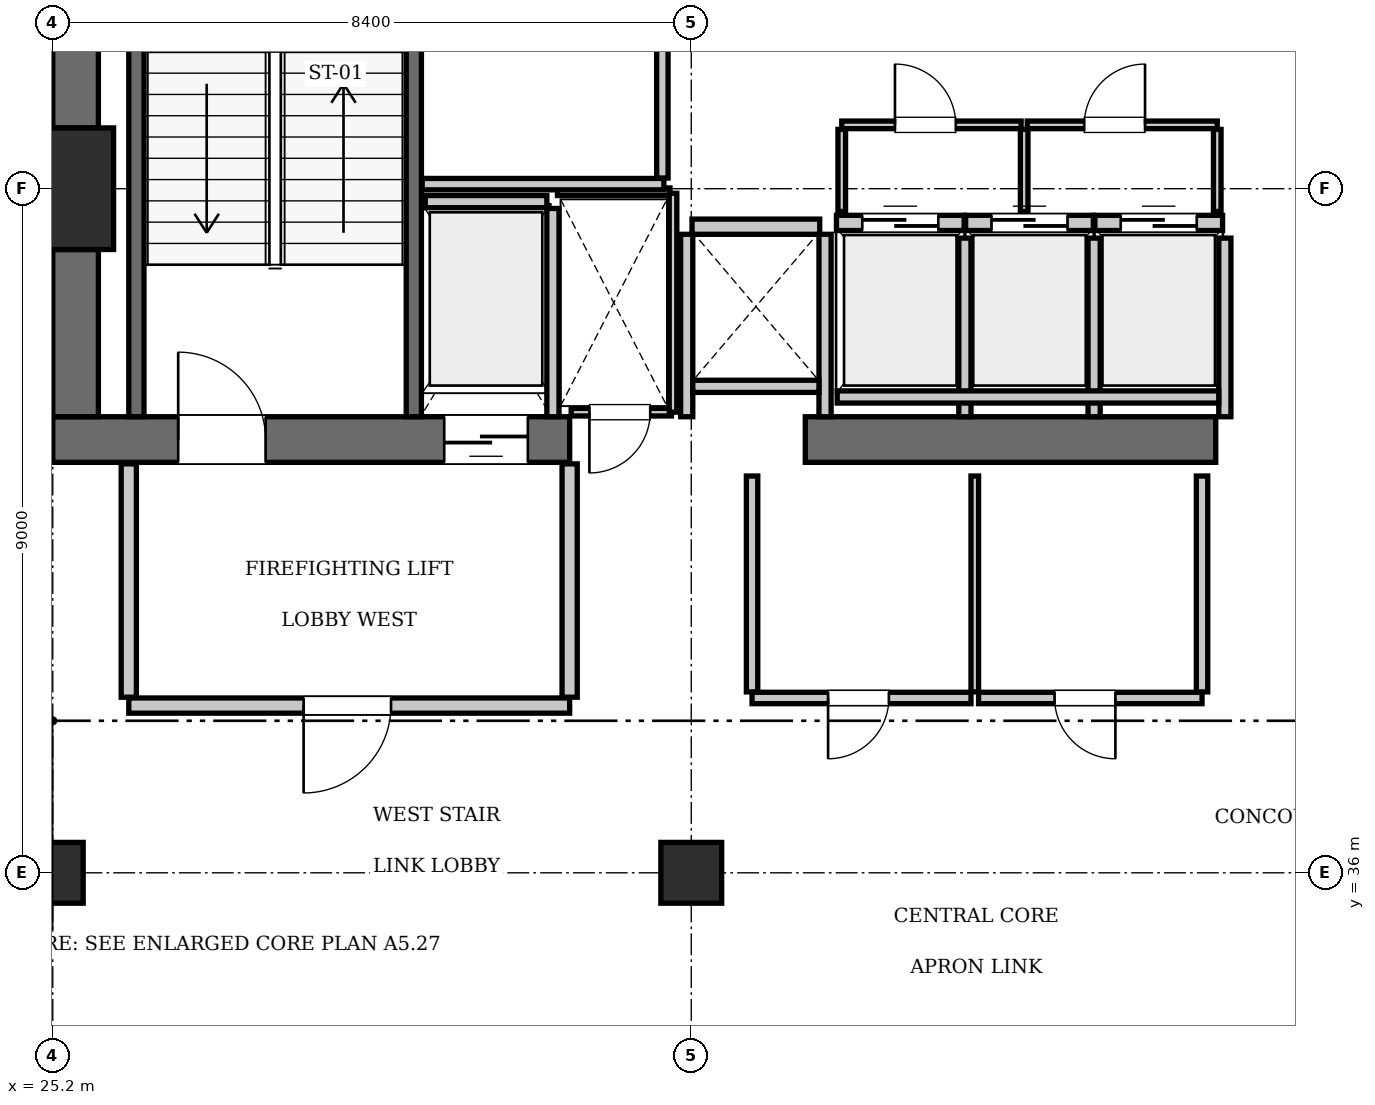
"""IFC4 building model, lengths in metres.
Left out: names, types, materials, properties, quantities, classifications, styles, units other than length and angle.
Written with IfcOpenShell. Run it as: python <this file> out.ifc"""

import sys

from ifc_helpers import new_model, si_unit, direction, frame, frame_2d, origin, origin_2d, place, context, subcontext, project, spatial, rectangle, extrude, element, fill, save


model = new_model("IFC4")
c1 = context("Model", 3, precision=1e-05, world=origin(), true_north=direction((0.0, 1.0)))
c2 = subcontext(c1, "Body", "Model", "MODEL_VIEW")
j1 = project(units=[si_unit("LENGTHUNIT", "METRE"), si_unit("PLANEANGLEUNIT", "RADIAN")], contexts=[c1])
p1 = place(None, origin())
s1 = spatial("IfcSite", under=j1, at=p1, CompositionType="ELEMENT")
p2 = place(p1, origin())
s2 = spatial("IfcBuilding", under=s1, at=p2, CompositionType="ELEMENT")
p3 = place(p2, frame((0.0, 0.0, 289.45)))
s3 = spatial("IfcBuildingStorey", under=s2, at=p3, CompositionType="ELEMENT", Elevation=289.45)
p4 = place(p3, frame((25.2, 45.0, 0.0), z_axis=(0.0, 0.0, 1.0), x_axis=(1.0, 0.0, 0.0)))
e1 = element("IfcColumn", 1, at=p4, inside=s3, PredefinedType="COLUMN", context=c2, shape_type="SweptSolid", body=[
    extrude(rectangle(XDim=1.6, YDim=1.6, at=origin_2d()), origin(), (0.0, 0.0, 1.0), 3.85),
])
p5 = place(p3, frame((25.2, 41.7, 0.0), z_axis=(0.0, 0.0, 1.0), x_axis=(1.0, 0.0, 0.0)))
e2 = element("IfcWall", 2, at=p5, inside=s3, PredefinedType="SHEAR", context=c2, shape_type="SweptSolid", body=[
    extrude(rectangle(XDim=6.8, YDim=0.6, at=frame_2d((3.4, 0.0))), origin(), (0.0, 0.0, 1.0), 3.85),
])
p6 = place(p5, frame((1.65, 0.0, 0.0)))
e3 = element("IfcOpeningElement", 3, at=p6, cuts=e2, PredefinedType="OPENING", context=c2, shape_type="SweptSolid", body=[
    extrude(rectangle(XDim=1.15, YDim=2.15, at=frame_2d((0.575, 1.075))), frame((0.0, 0.31, 0.0), z_axis=(0.0, -1.0, 0.0), x_axis=(1.0, 0.0, 0.0)), (0.0, 0.0, 1.0), 0.62),
])
p7 = place(p5, frame((5.15, 0.0, 0.0)))
e4 = element("IfcOpeningElement", 4, at=p7, cuts=e2, PredefinedType="OPENING", context=c2, shape_type="SweptSolid", body=[
    extrude(rectangle(XDim=1.1, YDim=2.2, at=frame_2d((0.55, 1.1))), frame((0.0, 0.31, 0.0), z_axis=(0.0, -1.0, 0.0), x_axis=(1.0, 0.0, 0.0)), (0.0, 0.0, 1.0), 0.62),
])
p8 = place(p3, frame((35.1, 41.7, 0.0), z_axis=(0.0, 0.0, 1.0), x_axis=(1.0, 0.0, 0.0)))
e5 = element("IfcWall", 5, at=p8, inside=s3, PredefinedType="SHEAR", context=c2, shape_type="SweptSolid", body=[
    extrude(rectangle(XDim=5.4, YDim=0.6, at=frame_2d((2.7, 0.0))), origin(), (0.0, 0.0, 1.0), 3.85),
])
p9 = place(p3, frame((25.5, 42.0, 0.0), z_axis=(0.0, 0.0, 1.0), x_axis=(0.0, 1.0, 0.0)))
e6 = element("IfcWall", 6, at=p9, inside=s3, PredefinedType="SHEAR", context=c2, shape_type="SweptSolid", body=[
    extrude(rectangle(XDim=2.2, YDim=0.6, at=frame_2d((1.1, 0.0))), origin(), (0.0, 0.0, 1.0), 3.85),
])
p10 = place(p3, frame((25.5, 45.8, 0.0), z_axis=(0.0, 0.0, 1.0), x_axis=(0.0, 1.0, 0.0)))
e7 = element("IfcWall", 7, at=p10, inside=s3, PredefinedType="SHEAR", context=c2, shape_type="SweptSolid", body=[
    extrude(rectangle(XDim=7.6, YDim=0.6, at=frame_2d((3.8, 0.0))), origin(), (0.0, 0.0, 1.0), 3.85),
])
for number, where, z_axis, x_axis in (
    (8, (25.2, 36.0, 0.0), (0.0, 0.0, 1.0), (1.0, 0.0, 0.0)),
    (9, (33.6, 36.0, 0.0), (0.0, 0.0, 1.0), (1.0, 0.0, 0.0)),
):
    element("IfcColumn", number, at=place(p3, frame(where, z_axis=z_axis, x_axis=x_axis)), inside=s3, PredefinedType="COLUMN", context=c2, shape_type="SweptSolid", body=[
        extrude(rectangle(XDim=0.8, YDim=0.8, at=origin_2d()), origin(), (0.0, 0.0, 1.0), 3.85),
    ])
p11 = place(p3, frame((29.95, 42.0, 0.0), z_axis=(0.0, 0.0, 1.0), x_axis=(0.0, 1.0, 0.0)))
e10 = element("IfcWall", 10, at=p11, inside=s3, PredefinedType="SOLIDWALL", context=c2, shape_type="SweptSolid", body=[
    extrude(rectangle(XDim=9.15, YDim=0.2, at=frame_2d((4.575, 0.0))), origin(), (0.0, 0.0, 1.0), 3.61),
])
p12 = place(p3, frame((26.3, 42.0, 0.0), z_axis=(0.0, 0.0, 1.0), x_axis=(0.0, 1.0, 0.0)))
e11 = element("IfcWall", 11, at=p12, inside=s3, PredefinedType="SOLIDWALL", context=c2, shape_type="SweptSolid", body=[
    extrude(rectangle(XDim=9.12, YDim=0.2, at=frame_2d((4.56, 0.0))), origin(), (0.0, 0.0, 1.0), 3.61),
])
p13 = place(p3, frame((35.51, 44.55, 0.0), z_axis=(0.0, 0.0, 1.0), x_axis=(1.0, 0.0, 0.0)))
e12 = element("IfcWall", 12, at=p13, inside=s3, PredefinedType="SOLIDWALL", context=c2, shape_type="SweptSolid", body=[
    extrude(rectangle(XDim=1.68, YDim=0.2, at=frame_2d((0.84, 0.0))), origin(), (0.0, 0.0, 1.0), 3.61),
])
p14 = place(p13, frame((0.34, 0.0, 0.0)))
e13 = element("IfcOpeningElement", 13, at=p14, cuts=e12, PredefinedType="OPENING", context=c2, shape_type="SweptSolid", body=[
    extrude(rectangle(XDim=1.0, YDim=2.15, at=frame_2d((0.5, 1.075))), frame((0.0, 0.11, 0.0), z_axis=(0.0, -1.0, 0.0), x_axis=(1.0, 0.0, 0.0)), (0.0, 0.0, 1.0), 0.22),
])
p15 = place(p3, frame((37.21, 44.55, 0.0), z_axis=(0.0, 0.0, 1.0), x_axis=(1.0, 0.0, 0.0)))
e14 = element("IfcWall", 14, at=p15, inside=s3, PredefinedType="SOLIDWALL", context=c2, shape_type="SweptSolid", body=[
    extrude(rectangle(XDim=1.68, YDim=0.2, at=frame_2d((0.84, 0.0))), origin(), (0.0, 0.0, 1.0), 3.61),
])
p16 = place(p15, frame((0.34, 0.0, 0.0)))
e15 = element("IfcOpeningElement", 15, at=p16, cuts=e14, PredefinedType="OPENING", context=c2, shape_type="SweptSolid", body=[
    extrude(rectangle(XDim=1.0, YDim=2.15, at=frame_2d((0.5, 1.075))), frame((0.0, 0.11, 0.0), z_axis=(0.0, -1.0, 0.0), x_axis=(1.0, 0.0, 0.0)), (0.0, 0.0, 1.0), 0.22),
])
p17 = place(p3, frame((38.91, 44.55, 0.0), z_axis=(0.0, 0.0, 1.0), x_axis=(1.0, 0.0, 0.0)))
e16 = element("IfcWall", 16, at=p17, inside=s3, PredefinedType="SOLIDWALL", context=c2, shape_type="SweptSolid", body=[
    extrude(rectangle(XDim=1.68, YDim=0.2, at=frame_2d((0.84, 0.0))), origin(), (0.0, 0.0, 1.0), 3.61),
])
p18 = place(p17, frame((0.34, 0.0, 0.0)))
e17 = element("IfcOpeningElement", 17, at=p18, cuts=e16, PredefinedType="OPENING", context=c2, shape_type="SweptSolid", body=[
    extrude(rectangle(XDim=1.0, YDim=2.15, at=frame_2d((0.5, 1.075))), frame((0.0, 0.11, 0.0), z_axis=(0.0, -1.0, 0.0), x_axis=(1.0, 0.0, 0.0)), (0.0, 0.0, 1.0), 0.22),
])
p19 = place(p3, frame((33.61, 44.5, 0.0), z_axis=(0.0, 0.0, 1.0), x_axis=(1.0, 0.0, 0.0)))
e18 = element("IfcWall", 18, at=p19, inside=s3, PredefinedType="SOLIDWALL", context=c2, shape_type="SweptSolid", body=[
    extrude(rectangle(XDim=1.68, YDim=0.2, at=frame_2d((0.84, 0.0))), origin(), (0.0, 0.0, 1.0), 3.61),
])
p20 = place(p3, frame((30.1, 44.83, 0.0), z_axis=(0.0, 0.0, 1.0), x_axis=(1.0, 0.0, 0.0)))
e19 = element("IfcWall", 19, at=p20, inside=s3, PredefinedType="SOLIDWALL", context=c2, shape_type="SweptSolid", body=[
    extrude(rectangle(XDim=1.6, YDim=0.16, at=frame_2d((0.8, 0.0))), origin(), (0.0, 0.0, 1.0), 3.61),
])
p21 = place(p3, frame((31.78, 42.0, 0.0), z_axis=(0.0, 0.0, 1.0), x_axis=(0.0, 1.0, 0.0)))
e20 = element("IfcWall", 20, at=p21, inside=s3, PredefinedType="SOLIDWALL", context=c2, shape_type="SweptSolid", body=[
    extrude(rectangle(XDim=2.74, YDim=0.16, at=frame_2d((1.37, 0.0))), origin(), (0.0, 0.0, 1.0), 3.61),
])
for number, where, z_axis, x_axis in (
    (21, (37.2, 42.0, 0.0), (0.0, 0.0, 1.0), (0.0, 1.0, 0.0)),
    (22, (38.9, 42.0, 0.0), (0.0, 0.0, 1.0), (0.0, 1.0, 0.0)),
    (23, (40.62, 42.0, 0.0), (0.0, 0.0, 1.0), (0.0, 1.0, 0.0)),
):
    element("IfcWall", number, at=place(p3, frame(where, z_axis=z_axis, x_axis=x_axis)), inside=s3, PredefinedType="SOLIDWALL", context=c2, shape_type="SweptSolid", body=[
        extrude(rectangle(XDim=2.35, YDim=0.16, at=frame_2d((1.175, 0.0))), origin(), (0.0, 0.0, 1.0), 3.61),
    ])
p22 = place(p3, frame((35.52, 42.26, 0.0), z_axis=(0.0, 0.0, 1.0), x_axis=(1.0, 0.0, 0.0)))
e24 = element("IfcWall", 24, at=p22, inside=s3, PredefinedType="SOLIDWALL", context=c2, shape_type="SweptSolid", body=[
    extrude(rectangle(XDim=5.02, YDim=0.16, at=frame_2d((2.51, 0.0))), origin(), (0.0, 0.0, 1.0), 3.61),
])
for number, where, z_axis, x_axis in (
    (25, (33.54, 42.0, 0.0), (0.0, 0.0, 1.0), (0.0, 1.0, 0.0)),
    (26, (35.36, 42.0, 0.0), (0.0, 0.0, 1.0), (0.0, 1.0, 0.0)),
):
    element("IfcWall", number, at=place(p3, frame(where, z_axis=z_axis, x_axis=x_axis)), inside=s3, PredefinedType="SOLIDWALL", context=c2, shape_type="SweptSolid", body=[
        extrude(rectangle(XDim=2.4, YDim=0.16, at=frame_2d((1.2, 0.0))), origin(), (0.0, 0.0, 1.0), 3.61),
    ])
p23 = place(p3, frame((33.62, 42.4, 0.0), z_axis=(0.0, 0.0, 1.0), x_axis=(1.0, 0.0, 0.0)))
e27 = element("IfcWall", 27, at=p23, inside=s3, PredefinedType="SOLIDWALL", context=c2, shape_type="SweptSolid", body=[
    extrude(rectangle(XDim=1.66, YDim=0.16, at=frame_2d((0.83, 0.0))), origin(), (0.0, 0.0, 1.0), 3.61),
])
p24 = place(p3, frame((26.2, 38.2, 0.0), z_axis=(0.0, 0.0, 1.0), x_axis=(1.0, 0.0, 0.0)))
e28 = element("IfcWall", 28, at=p24, inside=s3, PredefinedType="PARTITIONING", context=c2, shape_type="SweptSolid", body=[
    extrude(rectangle(XDim=5.8, YDim=0.2, at=frame_2d((2.9, 0.0))), origin(), (0.0, 0.0, 1.0), 3.61),
])
p25 = place(p24, frame((2.3, 0.0, 0.0)))
e29 = element("IfcOpeningElement", 29, at=p25, cuts=e28, PredefinedType="OPENING", context=c2, shape_type="SweptSolid", body=[
    extrude(rectangle(XDim=1.15, YDim=2.15, at=frame_2d((0.575, 1.075))), frame((0.0, 0.11, 0.0), z_axis=(0.0, -1.0, 0.0), x_axis=(1.0, 0.0, 0.0)), (0.0, 0.0, 1.0), 0.22),
])
for number, where, z_axis, x_axis in (
    (30, (26.2, 38.31, 0.0), (0.0, 0.0, 1.0), (0.0, 1.0, 0.0)),
    (31, (32.0, 38.31, 0.0), (0.0, 0.0, 1.0), (0.0, 1.0, 0.0)),
):
    element("IfcWall", number, at=place(p3, frame(where, z_axis=z_axis, x_axis=x_axis)), inside=s3, PredefinedType="PARTITIONING", context=c2, shape_type="SweptSolid", body=[
        extrude(rectangle(XDim=3.07, YDim=0.2, at=frame_2d((1.535, 0.0))), origin(), (0.0, 0.0, 1.0), 3.61),
    ])
p26 = place(p3, frame((32.02, 42.06, 0.0), z_axis=(0.0, 0.0, 1.0), x_axis=(1.0, 0.0, 0.0)))
e32 = element("IfcWall", 32, at=p26, inside=s3, PredefinedType="PARTITIONING", context=c2, shape_type="SweptSolid", body=[
    extrude(rectangle(XDim=1.32, YDim=0.1, at=frame_2d((0.66, 0.0))), origin(), (0.0, 0.0, 1.0), 3.61),
])
p27 = place(p26, frame((0.24, 0.0, 0.0)))
e33 = element("IfcOpeningElement", 33, at=p27, cuts=e32, PredefinedType="OPENING", context=c2, shape_type="SweptSolid", body=[
    extrude(rectangle(XDim=0.8, YDim=2.05, at=frame_2d((0.4, 1.025))), frame((0.0, 0.06, 0.0), z_axis=(0.0, -1.0, 0.0), x_axis=(1.0, 0.0, 0.0)), (0.0, 0.0, 1.0), 0.12),
])
p28 = place(p3, frame((31.84, 44.96, 0.0), z_axis=(0.0, 0.0, 1.0), x_axis=(1.0, 0.0, 0.0)))
e34 = element("IfcWall", 34, at=p28, inside=s3, PredefinedType="PARTITIONING", context=c2, shape_type="SweptSolid", body=[
    extrude(rectangle(XDim=1.48, YDim=0.1, at=frame_2d((0.74, 0.0))), origin(), (0.0, 0.0, 1.0), 3.61),
])
p29 = place(p3, frame((33.36, 42.06, 0.0), z_axis=(0.0, 0.0, 1.0), x_axis=(0.0, 1.0, 0.0)))
e35 = element("IfcWall", 35, at=p29, inside=s3, PredefinedType="PARTITIONING", context=c2, shape_type="SweptSolid", body=[
    extrude(rectangle(XDim=2.88, YDim=0.1, at=frame_2d((1.44, 0.0))), origin(), (0.0, 0.0, 1.0), 3.61),
])
p30 = place(p3, frame((35.58, 45.84, 0.0), z_axis=(0.0, 0.0, 1.0), x_axis=(1.0, 0.0, 0.0)))
e36 = element("IfcWall", 36, at=p30, inside=s3, PredefinedType="PARTITIONING", context=c2, shape_type="SweptSolid", body=[
    extrude(rectangle(XDim=2.36, YDim=0.1, at=frame_2d((1.18, 0.0))), origin(), (0.0, 0.0, 1.0), 3.61),
])
p31 = place(p30, frame((0.7, 0.0, 0.0)))
e37 = element("IfcOpeningElement", 37, at=p31, cuts=e36, PredefinedType="OPENING", context=c2, shape_type="SweptSolid", body=[
    extrude(rectangle(XDim=0.8, YDim=2.05, at=frame_2d((0.4, 1.025))), frame((0.0, 0.06, 0.0), z_axis=(0.0, -1.0, 0.0), x_axis=(1.0, 0.0, 0.0)), (0.0, 0.0, 1.0), 0.12),
])
p32 = place(p3, frame((38.02, 45.84, 0.0), z_axis=(0.0, 0.0, 1.0), x_axis=(1.0, 0.0, 0.0)))
e38 = element("IfcWall", 38, at=p32, inside=s3, PredefinedType="PARTITIONING", context=c2, shape_type="SweptSolid", body=[
    extrude(rectangle(XDim=2.5, YDim=0.1, at=frame_2d((1.25, 0.0))), origin(), (0.0, 0.0, 1.0), 3.61),
])
p33 = place(p32, frame((0.75, 0.0, 0.0)))
e39 = element("IfcOpeningElement", 39, at=p33, cuts=e38, PredefinedType="OPENING", context=c2, shape_type="SweptSolid", body=[
    extrude(rectangle(XDim=0.8, YDim=2.05, at=frame_2d((0.4, 1.025))), frame((0.0, 0.06, 0.0), z_axis=(0.0, -1.0, 0.0), x_axis=(1.0, 0.0, 0.0)), (0.0, 0.0, 1.0), 0.12),
])
for number, where, z_axis, x_axis in (
    (40, (35.58, 44.7, 0.0), (0.0, 0.0, 1.0), (0.0, 1.0, 0.0)),
    (41, (37.98, 44.7, 0.0), (0.0, 0.0, 1.0), (0.0, 1.0, 0.0)),
    (42, (40.52, 44.7, 0.0), (0.0, 0.0, 1.0), (0.0, 1.0, 0.0)),
):
    element("IfcWall", number, at=place(p3, frame(where, z_axis=z_axis, x_axis=x_axis)), inside=s3, PredefinedType="PARTITIONING", context=c2, shape_type="SweptSolid", body=[
        extrude(rectangle(XDim=1.08, YDim=0.1, at=frame_2d((0.54, 0.0))), origin(), (0.0, 0.0, 1.0), 3.61),
    ])
p34 = place(p3, frame((30.06, 45.06, 0.0), z_axis=(0.0, 0.0, 1.0), x_axis=(1.0, 0.0, 0.0)))
e43 = element("IfcWall", 43, at=p34, inside=s3, PredefinedType="PARTITIONING", context=c2, shape_type="SweptSolid", body=[
    extrude(rectangle(XDim=3.18, YDim=0.15, at=frame_2d((1.59, 0.0))), origin(), (0.0, 0.0, 1.0), 3.61),
])
p35 = place(p3, frame((33.22, 45.14, 0.0), z_axis=(0.0, 0.0, 1.0), x_axis=(0.0, 1.0, 0.0)))
e44 = element("IfcWall", 44, at=p35, inside=s3, PredefinedType="PARTITIONING", context=c2, shape_type="SweptSolid", body=[
    extrude(rectangle(XDim=4.16, YDim=0.15, at=frame_2d((2.08, 0.0))), origin(), (0.0, 0.0, 1.0), 3.61),
])
p36 = place(p3, frame((34.4, 38.3, 0.0), z_axis=(0.0, 0.0, 1.0), x_axis=(1.0, 0.0, 0.0)))
e45 = element("IfcWall", 45, at=p36, inside=s3, PredefinedType="PARTITIONING", context=c2, shape_type="SweptSolid", body=[
    extrude(rectangle(XDim=2.88, YDim=0.15, at=frame_2d((1.44, 0.0))), origin(), (0.0, 0.0, 1.0), 3.61),
])
p37 = place(p36, frame((1.0, 0.0, 0.0)))
e46 = element("IfcOpeningElement", 46, at=p37, cuts=e45, PredefinedType="OPENING", context=c2, shape_type="SweptSolid", body=[
    extrude(rectangle(XDim=0.8, YDim=2.05, at=frame_2d((0.4, 1.025))), frame((0.0, 0.085, 0.0), z_axis=(0.0, -1.0, 0.0), x_axis=(1.0, 0.0, 0.0)), (0.0, 0.0, 1.0), 0.17),
])
p38 = place(p3, frame((37.38, 38.3, 0.0), z_axis=(0.0, 0.0, 1.0), x_axis=(1.0, 0.0, 0.0)))
e47 = element("IfcWall", 47, at=p38, inside=s3, PredefinedType="PARTITIONING", context=c2, shape_type="SweptSolid", body=[
    extrude(rectangle(XDim=2.94, YDim=0.15, at=frame_2d((1.47, 0.0))), origin(), (0.0, 0.0, 1.0), 3.61),
])
p39 = place(p38, frame((1.0, 0.0, 0.0)))
e48 = element("IfcOpeningElement", 48, at=p39, cuts=e47, PredefinedType="OPENING", context=c2, shape_type="SweptSolid", body=[
    extrude(rectangle(XDim=0.8, YDim=2.05, at=frame_2d((0.4, 1.025))), frame((0.0, 0.085, 0.0), z_axis=(0.0, -1.0, 0.0), x_axis=(1.0, 0.0, 0.0)), (0.0, 0.0, 1.0), 0.17),
])
p40 = place(p3, frame((34.4, 38.38, 0.0), z_axis=(0.0, 0.0, 1.0), x_axis=(0.0, 1.0, 0.0)))
e49 = element("IfcWall", 49, at=p40, inside=s3, PredefinedType="PARTITIONING", context=c2, shape_type="SweptSolid", body=[
    extrude(rectangle(XDim=2.84, YDim=0.15, at=frame_2d((1.42, 0.0))), origin(), (0.0, 0.0, 1.0), 3.61),
])
p41 = place(p3, frame((37.33, 38.38, 0.0), z_axis=(0.0, 0.0, 1.0), x_axis=(0.0, 1.0, 0.0)))
e50 = element("IfcWall", 50, at=p41, inside=s3, PredefinedType="PARTITIONING", context=c2, shape_type="SweptSolid", body=[
    extrude(rectangle(XDim=2.84, YDim=0.1, at=frame_2d((1.42, 0.0))), origin(), (0.0, 0.0, 1.0), 3.61),
])
p42 = place(p3, frame((40.32, 38.38, 0.0), z_axis=(0.0, 0.0, 1.0), x_axis=(0.0, 1.0, 0.0)))
e51 = element("IfcWall", 51, at=p42, inside=s3, PredefinedType="PARTITIONING", context=c2, shape_type="SweptSolid", body=[
    extrude(rectangle(XDim=2.84, YDim=0.15, at=frame_2d((1.42, 0.0))), origin(), (0.0, 0.0, 1.0), 3.61),
])
p43 = place(p6, origin())
e52 = element("IfcDoor", 52, at=p43, inside=s3, OperationType="SINGLE_SWING_LEFT", PredefinedType="DOOR", context=c2, shape_type="SweptSolid", body=[
    extrude(rectangle(XDim=1.15, YDim=2.15, at=frame_2d((0.575, 1.075))), frame((0.0, 0.025, 0.0), z_axis=(0.0, -1.0, 0.0), x_axis=(1.0, 0.0, 0.0)), (0.0, 0.0, 1.0), 0.05),
])
fill(e3, e52)
p44 = place(p14, origin())
e53 = element("IfcDoor", 53, at=p44, inside=s3, OperationType="SLIDING_TO_LEFT", PredefinedType="DOOR", context=c2, shape_type="SweptSolid", body=[
    extrude(rectangle(XDim=1.0, YDim=2.15, at=frame_2d((0.5, 1.075))), frame((0.0, 0.025, 0.0), z_axis=(0.0, -1.0, 0.0), x_axis=(1.0, 0.0, 0.0)), (0.0, 0.0, 1.0), 0.05),
])
fill(e13, e53)
p45 = place(p16, origin())
e54 = element("IfcDoor", 54, at=p45, inside=s3, OperationType="SLIDING_TO_LEFT", PredefinedType="DOOR", context=c2, shape_type="SweptSolid", body=[
    extrude(rectangle(XDim=1.0, YDim=2.15, at=frame_2d((0.5, 1.075))), frame((0.0, 0.025, 0.0), z_axis=(0.0, -1.0, 0.0), x_axis=(1.0, 0.0, 0.0)), (0.0, 0.0, 1.0), 0.05),
])
fill(e15, e54)
p46 = place(p18, origin())
e55 = element("IfcDoor", 55, at=p46, inside=s3, OperationType="SLIDING_TO_LEFT", PredefinedType="DOOR", context=c2, shape_type="SweptSolid", body=[
    extrude(rectangle(XDim=1.0, YDim=2.15, at=frame_2d((0.5, 1.075))), frame((0.0, 0.025, 0.0), z_axis=(0.0, -1.0, 0.0), x_axis=(1.0, 0.0, 0.0)), (0.0, 0.0, 1.0), 0.05),
])
fill(e17, e55)
p47 = place(p7, frame((1.1, 0.0, 0.0), z_axis=(0.0, 0.0, 1.0), x_axis=(-1.0, 0.0, 0.0)))
e56 = element("IfcDoor", 56, at=p47, inside=s3, OperationType="SLIDING_TO_LEFT", PredefinedType="DOOR", context=c2, shape_type="SweptSolid", body=[
    extrude(rectangle(XDim=1.1, YDim=2.2, at=frame_2d((0.55, 1.1))), frame((0.0, 0.025, 0.0), z_axis=(0.0, -1.0, 0.0), x_axis=(1.0, 0.0, 0.0)), (0.0, 0.0, 1.0), 0.05),
])
fill(e4, e56)
p48 = place(p25, frame((1.15, 0.0, 0.0), z_axis=(0.0, 0.0, 1.0), x_axis=(-1.0, 0.0, 0.0)))
e57 = element("IfcDoor", 57, at=p48, inside=s3, OperationType="SINGLE_SWING_RIGHT", PredefinedType="DOOR", context=c2, shape_type="SweptSolid", body=[
    extrude(rectangle(XDim=1.15, YDim=2.15, at=frame_2d((0.575, 1.075))), frame((0.0, 0.025, 0.0), z_axis=(0.0, -1.0, 0.0), x_axis=(1.0, 0.0, 0.0)), (0.0, 0.0, 1.0), 0.05),
])
fill(e29, e57)
p49 = place(p27, frame((0.8, 0.0, 0.0), z_axis=(0.0, 0.0, 1.0), x_axis=(-1.0, 0.0, 0.0)))
e58 = element("IfcDoor", 58, at=p49, inside=s3, OperationType="SINGLE_SWING_RIGHT", PredefinedType="DOOR", context=c2, shape_type="SweptSolid", body=[
    extrude(rectangle(XDim=0.8, YDim=2.05, at=frame_2d((0.4, 1.025))), frame((0.0, 0.025, 0.0), z_axis=(0.0, -1.0, 0.0), x_axis=(1.0, 0.0, 0.0)), (0.0, 0.0, 1.0), 0.05),
])
fill(e33, e58)
p50 = place(p31, origin())
e59 = element("IfcDoor", 59, at=p50, inside=s3, OperationType="SINGLE_SWING_LEFT", PredefinedType="DOOR", context=c2, shape_type="SweptSolid", body=[
    extrude(rectangle(XDim=0.8, YDim=2.05, at=frame_2d((0.4, 1.025))), frame((0.0, 0.025, 0.0), z_axis=(0.0, -1.0, 0.0), x_axis=(1.0, 0.0, 0.0)), (0.0, 0.0, 1.0), 0.05),
])
fill(e37, e59)
p51 = place(p33, origin())
e60 = element("IfcDoor", 60, at=p51, inside=s3, OperationType="SINGLE_SWING_RIGHT", PredefinedType="DOOR", context=c2, shape_type="SweptSolid", body=[
    extrude(rectangle(XDim=0.8, YDim=2.05, at=frame_2d((0.4, 1.025))), frame((0.0, 0.025, 0.0), z_axis=(0.0, -1.0, 0.0), x_axis=(1.0, 0.0, 0.0)), (0.0, 0.0, 1.0), 0.05),
])
fill(e39, e60)
p52 = place(p37, frame((0.8, 0.0, 0.0), z_axis=(0.0, 0.0, 1.0), x_axis=(-1.0, 0.0, 0.0)))
e61 = element("IfcDoor", 61, at=p52, inside=s3, OperationType="SINGLE_SWING_RIGHT", PredefinedType="DOOR", context=c2, shape_type="SweptSolid", body=[
    extrude(rectangle(XDim=0.8, YDim=2.05, at=frame_2d((0.4, 1.025))), frame((0.0, 0.025, 0.0), z_axis=(0.0, -1.0, 0.0), x_axis=(1.0, 0.0, 0.0)), (0.0, 0.0, 1.0), 0.05),
])
fill(e46, e61)
p53 = place(p39, frame((0.8, 0.0, 0.0), z_axis=(0.0, 0.0, 1.0), x_axis=(-1.0, 0.0, 0.0)))
e62 = element("IfcDoor", 62, at=p53, inside=s3, OperationType="SINGLE_SWING_LEFT", PredefinedType="DOOR", context=c2, shape_type="SweptSolid", body=[
    extrude(rectangle(XDim=0.8, YDim=2.05, at=frame_2d((0.4, 1.025))), frame((0.0, 0.025, 0.0), z_axis=(0.0, -1.0, 0.0), x_axis=(1.0, 0.0, 0.0)), (0.0, 0.0, 1.0), 0.05),
])
fill(e48, e62)
save(model, sys.argv[1])
